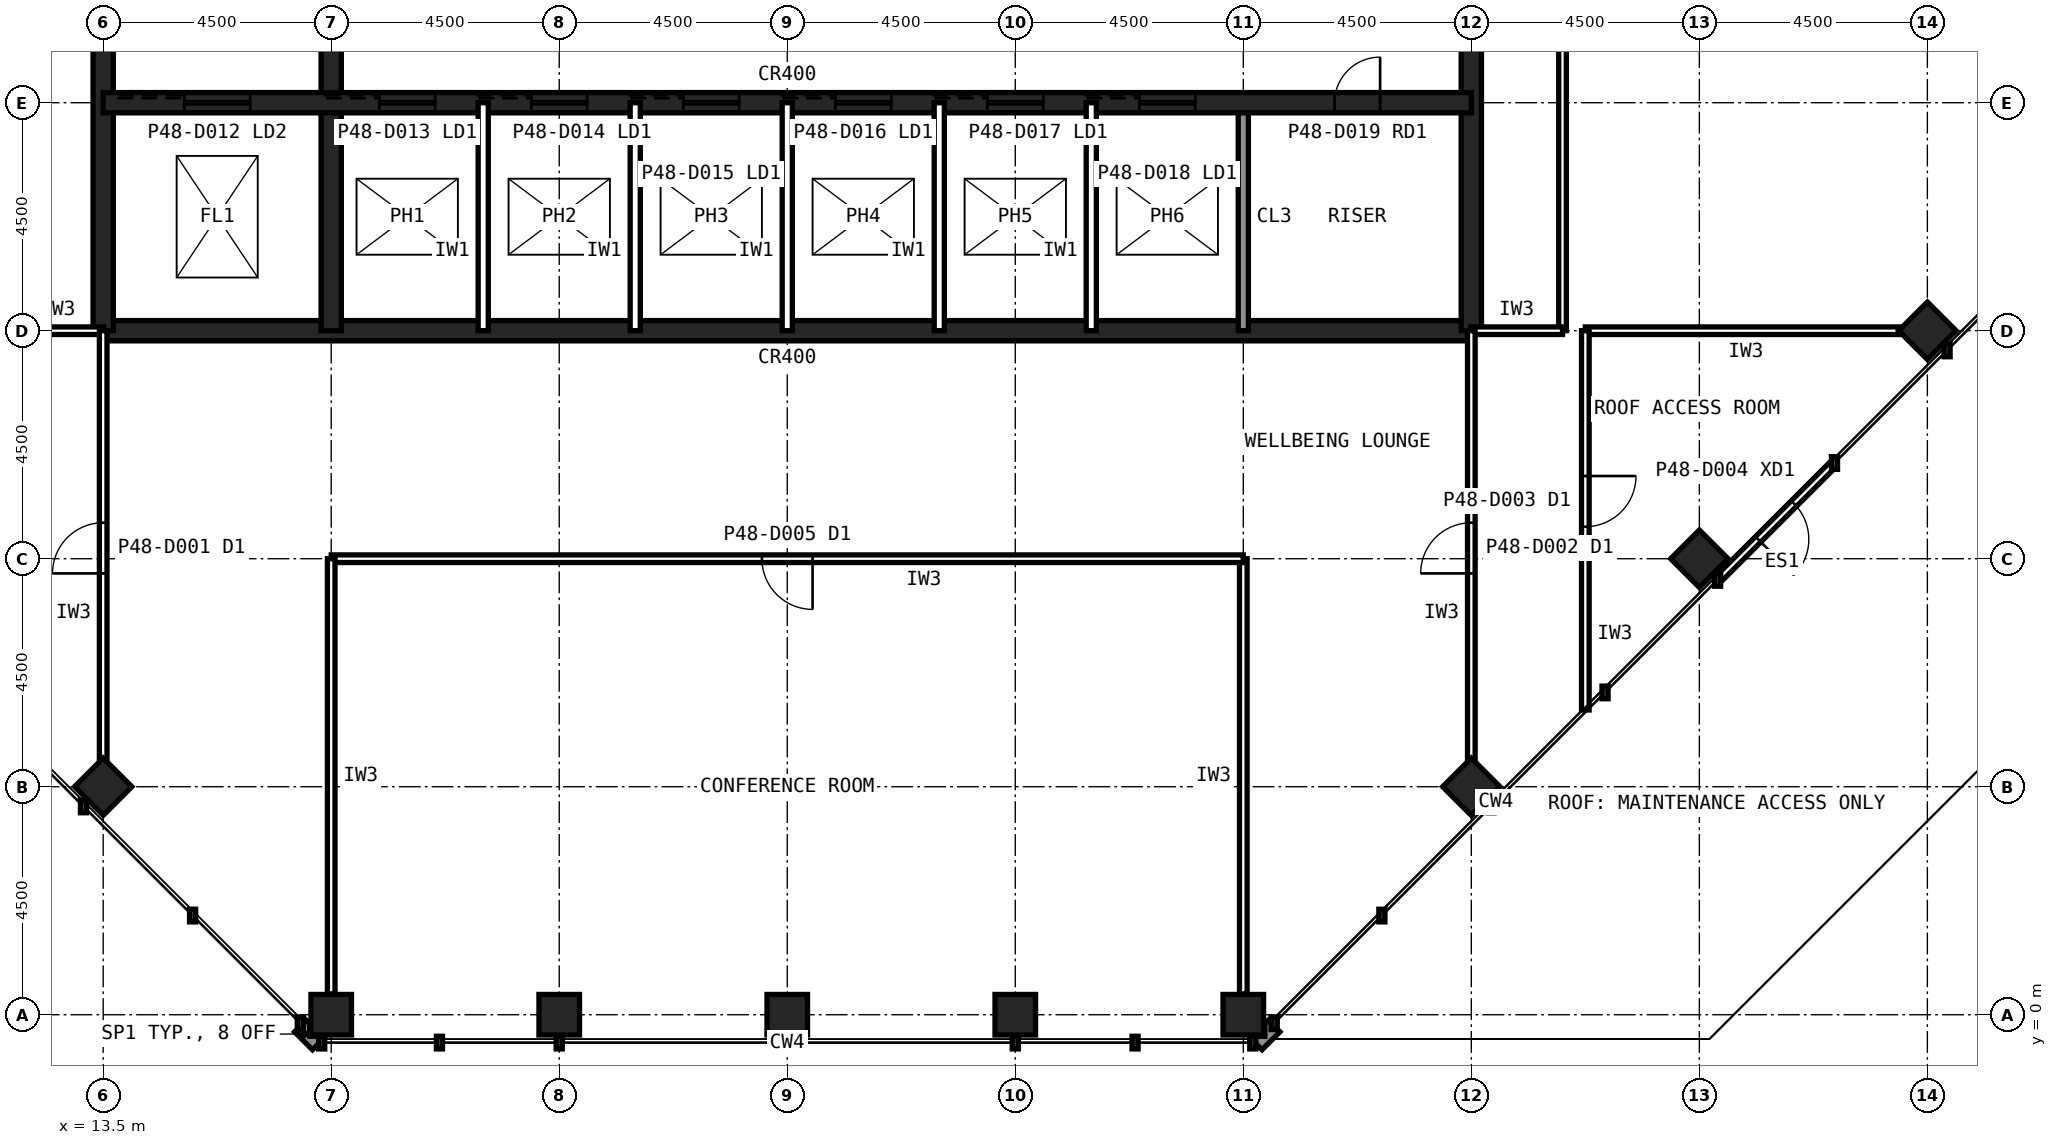
"""IFC4 building model, lengths in metres.
Left out: names, types, materials, properties, quantities, classifications, styles, units other than length and angle.
Written with IfcOpenShell. Run it as: python <this file> out.ifc"""

import sys

from ifc_helpers import new_model, si_unit, direction, frame, frame_2d, origin, origin_2d, place, context, subcontext, project, spatial, rectangle, hollow_rectangle, extrude, element, fill, save


model = new_model("IFC4")
c1 = context("Model", 3, precision=1e-05, world=origin(), true_north=direction((0.0, 1.0)))
c2 = subcontext(c1, "Body", "Model", "MODEL_VIEW")
j1 = project(units=[si_unit("LENGTHUNIT", "METRE"), si_unit("PLANEANGLEUNIT", "RADIAN")], contexts=[c1])
p1 = place(None, origin())
s1 = spatial("IfcSite", under=j1, at=p1, CompositionType="ELEMENT")
p2 = place(p1, origin())
s2 = spatial("IfcBuilding", under=s1, at=p2, CompositionType="ELEMENT")
p3 = place(p2, frame((0.0, 0.0, 205.6)))
s3 = spatial("IfcBuildingStorey", under=s2, at=p3, CompositionType="ELEMENT", Elevation=205.6)
for number, where, z_axis, x_axis in (
    (1, (18.0, 0.0, 0.0), (0.0, 0.0, 1.0), (1.0, 0.0, 0.0)),
    (2, (22.5, 0.0, 0.0), (0.0, 0.0, 1.0), (1.0, 0.0, 0.0)),
    (3, (27.0, 0.0, 0.0), (0.0, 0.0, 1.0), (1.0, 0.0, 0.0)),
    (4, (31.5, 0.0, 0.0), (0.0, 0.0, 1.0), (1.0, 0.0, 0.0)),
    (5, (36.0, 0.0, 0.0), (0.0, 0.0, 1.0), (1.0, 0.0, 0.0)),
    (6, (13.5, 4.5, 0.0), (0.0, 0.0, 1.0), (0.707, 0.707, 0.0)),
    (7, (40.5, 4.5, 0.0), (0.0, 0.0, 1.0), (0.707, 0.707, 0.0)),
    (8, (45.0, 9.0, 0.0), (0.0, 0.0, 1.0), (0.707, 0.707, 0.0)),
    (9, (49.5, 13.5, 0.0), (0.0, 0.0, 1.0), (0.707, 0.707, 0.0)),
):
    element("IfcColumn", number, at=place(p3, frame(where, z_axis=z_axis, x_axis=x_axis)), inside=s3, PredefinedType="COLUMN", context=c2, shape_type="SweptSolid", body=[
        extrude(hollow_rectangle(XDim=0.8, YDim=0.8, WallThickness=0.063, at=origin_2d()), origin(), (0.0, 0.0, 1.0), 5.0),
    ])
p4 = place(p3, frame((13.5, 13.5, 0.0), z_axis=(0.0, 0.0, 1.0), x_axis=(1.0, 0.0, 0.0)))
e10 = element("IfcWall", 10, at=p4, inside=s3, PredefinedType="SHEAR", context=c2, shape_type="SweptSolid", body=[
    extrude(rectangle(XDim=27.0, YDim=0.4, at=frame_2d((13.5, 0.0))), origin(), (0.0, 0.0, 1.0), 5.0),
])
p5 = place(p3, frame((40.5, 13.5, 0.0), z_axis=(0.0, 0.0, 1.0), x_axis=(0.0, 1.0, 0.0)))
e11 = element("IfcWall", 11, at=p5, inside=s3, PredefinedType="SHEAR", context=c2, shape_type="SweptSolid", body=[
    extrude(rectangle(XDim=27.0, YDim=0.4, at=frame_2d((13.5, 0.0))), origin(), (0.0, 0.0, 1.0), 5.0),
])
p6 = place(p5, frame((5.85, 0.0, 0.0)))
e12 = element("IfcOpeningElement", 12, at=p6, cuts=e11, PredefinedType="OPENING", context=c2, shape_type="SweptSolid", body=[
    extrude(rectangle(XDim=1.8, YDim=2.1, at=frame_2d((0.9, 1.05))), frame((0.0, 0.21, 0.0), z_axis=(0.0, -1.0, 0.0), x_axis=(1.0, 0.0, 0.0)), (0.0, 0.0, 1.0), 0.42),
])
p7 = place(p5, frame((19.65, 0.0, 0.0)))
e13 = element("IfcOpeningElement", 13, at=p7, cuts=e11, PredefinedType="OPENING", context=c2, shape_type="SweptSolid", body=[
    extrude(rectangle(XDim=1.2, YDim=2.1, at=frame_2d((0.6, 1.05))), frame((0.0, 0.21, 0.0), z_axis=(0.0, -1.0, 0.0), x_axis=(1.0, 0.0, 0.0)), (0.0, 0.0, 1.0), 0.42),
])
p8 = place(p3, frame((13.5, 40.5, 0.0), z_axis=(0.0, 0.0, 1.0), x_axis=(0.0, -1.0, 0.0)))
e14 = element("IfcWall", 14, at=p8, inside=s3, PredefinedType="SHEAR", context=c2, shape_type="SweptSolid", body=[
    extrude(rectangle(XDim=27.0, YDim=0.4, at=frame_2d((13.5, 0.0))), origin(), (0.0, 0.0, 1.0), 5.0),
])
p9 = place(p8, frame((19.65, 0.0, 0.0)))
e15 = element("IfcOpeningElement", 15, at=p9, cuts=e14, PredefinedType="OPENING", context=c2, shape_type="SweptSolid", body=[
    extrude(rectangle(XDim=1.2, YDim=2.1, at=frame_2d((0.6, 1.05))), frame((0.0, 0.21, 0.0), z_axis=(0.0, -1.0, 0.0), x_axis=(1.0, 0.0, 0.0)), (0.0, 0.0, 1.0), 0.42),
])
p10 = place(p8, frame((5.85, 0.0, 0.0)))
e16 = element("IfcOpeningElement", 16, at=p10, cuts=e14, PredefinedType="OPENING", context=c2, shape_type="SweptSolid", body=[
    extrude(rectangle(XDim=1.8, YDim=2.1, at=frame_2d((0.9, 1.05))), frame((0.0, 0.21, 0.0), z_axis=(0.0, -1.0, 0.0), x_axis=(1.0, 0.0, 0.0)), (0.0, 0.0, 1.0), 0.42),
])
p11 = place(p3, frame((18.0, 13.5, 0.0), z_axis=(0.0, 0.0, 1.0), x_axis=(0.0, 1.0, 0.0)))
e17 = element("IfcWall", 17, at=p11, inside=s3, PredefinedType="SHEAR", context=c2, shape_type="SweptSolid", body=[
    extrude(rectangle(XDim=18.0, YDim=0.4, at=frame_2d((9.0, 0.0))), origin(), (0.0, 0.0, 1.0), 5.0),
])
p12 = place(p3, frame((36.0, 13.5, 0.0), z_axis=(0.0, 0.0, 1.0), x_axis=(0.0, 1.0, 0.0)))
e18 = element("IfcWall", 18, at=p12, inside=s3, PredefinedType="SOLIDWALL", context=c2, shape_type="SweptSolid", body=[
    extrude(rectangle(XDim=4.5, YDim=0.2, at=frame_2d((2.25, 0.0))), origin(), (0.0, 0.0, 1.0), 4.84),
])
p13 = place(p3, frame((13.5, 18.0, 0.0), z_axis=(0.0, 0.0, 1.0), x_axis=(1.0, 0.0, 0.0)))
e19 = element("IfcWall", 19, at=p13, inside=s3, PredefinedType="SHEAR", context=c2, shape_type="SweptSolid", body=[
    extrude(rectangle(XDim=27.0, YDim=0.4, at=frame_2d((13.5, 0.0))), origin(), (0.0, 0.0, 1.0), 5.0),
])
p14 = place(p13, frame((24.3, 0.0, 0.0)))
e20 = element("IfcOpeningElement", 20, at=p14, cuts=e19, PredefinedType="OPENING", context=c2, shape_type="SweptSolid", body=[
    extrude(rectangle(XDim=0.9, YDim=2.1, at=frame_2d((0.45, 1.05))), frame((0.0, 0.21, 0.0), z_axis=(0.0, -1.0, 0.0), x_axis=(1.0, 0.0, 0.0)), (0.0, 0.0, 1.0), 0.42),
])
p15 = place(p13, frame((5.45, 0.0, 0.0)))
e21 = element("IfcOpeningElement", 21, at=p15, cuts=e19, PredefinedType="OPENING", context=c2, shape_type="SweptSolid", body=[
    extrude(rectangle(XDim=1.1, YDim=2.1, at=frame_2d((0.55, 1.05))), frame((0.0, 0.21, 0.0), z_axis=(0.0, -1.0, 0.0), x_axis=(1.0, 0.0, 0.0)), (0.0, 0.0, 1.0), 0.42),
])
p16 = place(p13, frame((8.45, 0.0, 0.0)))
e22 = element("IfcOpeningElement", 22, at=p16, cuts=e19, PredefinedType="OPENING", context=c2, shape_type="SweptSolid", body=[
    extrude(rectangle(XDim=1.1, YDim=2.1, at=frame_2d((0.55, 1.05))), frame((0.0, 0.21, 0.0), z_axis=(0.0, -1.0, 0.0), x_axis=(1.0, 0.0, 0.0)), (0.0, 0.0, 1.0), 0.42),
])
p17 = place(p13, frame((11.45, 0.0, 0.0)))
e23 = element("IfcOpeningElement", 23, at=p17, cuts=e19, PredefinedType="OPENING", context=c2, shape_type="SweptSolid", body=[
    extrude(rectangle(XDim=1.1, YDim=2.1, at=frame_2d((0.55, 1.05))), frame((0.0, 0.21, 0.0), z_axis=(0.0, -1.0, 0.0), x_axis=(1.0, 0.0, 0.0)), (0.0, 0.0, 1.0), 0.42),
])
p18 = place(p13, frame((14.45, 0.0, 0.0)))
e24 = element("IfcOpeningElement", 24, at=p18, cuts=e19, PredefinedType="OPENING", context=c2, shape_type="SweptSolid", body=[
    extrude(rectangle(XDim=1.1, YDim=2.1, at=frame_2d((0.55, 1.05))), frame((0.0, 0.21, 0.0), z_axis=(0.0, -1.0, 0.0), x_axis=(1.0, 0.0, 0.0)), (0.0, 0.0, 1.0), 0.42),
])
p19 = place(p13, frame((17.45, 0.0, 0.0)))
e25 = element("IfcOpeningElement", 25, at=p19, cuts=e19, PredefinedType="OPENING", context=c2, shape_type="SweptSolid", body=[
    extrude(rectangle(XDim=1.1, YDim=2.1, at=frame_2d((0.55, 1.05))), frame((0.0, 0.21, 0.0), z_axis=(0.0, -1.0, 0.0), x_axis=(1.0, 0.0, 0.0)), (0.0, 0.0, 1.0), 0.42),
])
p20 = place(p13, frame((20.45, 0.0, 0.0)))
e26 = element("IfcOpeningElement", 26, at=p20, cuts=e19, PredefinedType="OPENING", context=c2, shape_type="SweptSolid", body=[
    extrude(rectangle(XDim=1.1, YDim=2.1, at=frame_2d((0.55, 1.05))), frame((0.0, 0.21, 0.0), z_axis=(0.0, -1.0, 0.0), x_axis=(1.0, 0.0, 0.0)), (0.0, 0.0, 1.0), 0.42),
])
p21 = place(p13, frame((1.6, 0.0, 0.0)))
e27 = element("IfcOpeningElement", 27, at=p21, cuts=e19, PredefinedType="OPENING", context=c2, shape_type="SweptSolid", body=[
    extrude(rectangle(XDim=1.3, YDim=2.2, at=frame_2d((0.65, 1.1))), frame((0.0, 0.21, 0.0), z_axis=(0.0, -1.0, 0.0), x_axis=(1.0, 0.0, 0.0)), (0.0, 0.0, 1.0), 0.42),
])
p22 = place(p3, frame((47.639, 10.861, 0.0), z_axis=(0.0, 0.0, 1.0), x_axis=(-0.707106781187, -0.707106781187, 0.0)))
e28 = element("IfcWall", 28, at=p22, inside=s3, PredefinedType="USERDEFINED", context=c2, shape_type="SweptSolid", body=[
    extrude(rectangle(XDim=3.182, YDim=0.15, at=frame_2d((1.591, 0.0))), origin(), (0.0, 0.0, 1.0), 5.0),
])
p23 = place(p22, frame((1.091, 0.0, 0.0)))
e29 = element("IfcOpeningElement", 29, at=p23, cuts=e28, PredefinedType="OPENING", context=c2, shape_type="SweptSolid", body=[
    extrude(rectangle(XDim=1.0, YDim=2.1, at=frame_2d((0.5, 1.05))), frame((0.0, 0.085, 0.0), z_axis=(0.0, -1.0, 0.0), x_axis=(1.0, 0.0, 0.0)), (0.0, 0.0, 1.0), 0.17),
])
for number, where, z_axis, x_axis in (
    (30, (21.0, 13.5, 0.0), (0.0, 0.0, 1.0), (0.0, 1.0, 0.0)),
    (31, (24.0, 13.5, 0.0), (0.0, 0.0, 1.0), (0.0, 1.0, 0.0)),
    (32, (27.0, 13.5, 0.0), (0.0, 0.0, 1.0), (0.0, 1.0, 0.0)),
    (33, (30.0, 13.5, 0.0), (0.0, 0.0, 1.0), (0.0, 1.0, 0.0)),
    (34, (33.0, 13.5, 0.0), (0.0, 0.0, 1.0), (0.0, 1.0, 0.0)),
):
    element("IfcWall", number, at=place(p3, frame(where, z_axis=z_axis, x_axis=x_axis)), inside=s3, PredefinedType="PARTITIONING", context=c2, shape_type="SweptSolid", body=[
        extrude(rectangle(XDim=4.5, YDim=0.2, at=frame_2d((2.25, 0.0))), origin(), (0.0, 0.0, 1.0), 4.84),
    ])
p24 = place(p3, frame((42.3, 13.5, 0.0), z_axis=(0.0, 0.0, 1.0), x_axis=(0.0, 1.0, 0.0)))
e35 = element("IfcWall", 35, at=p24, inside=s3, PredefinedType="PARTITIONING", context=c2, shape_type="SweptSolid", body=[
    extrude(rectangle(XDim=27.0, YDim=0.15, at=frame_2d((13.5, 0.0))), origin(), (0.0, 0.0, 1.0), 4.84),
])
p25 = place(p24, frame((13.0, 0.0, 0.0)))
e36 = element("IfcOpeningElement", 36, at=p25, cuts=e35, PredefinedType="OPENING", context=c2, shape_type="SweptSolid", body=[
    extrude(rectangle(XDim=1.0, YDim=2.1, at=frame_2d((0.5, 1.05))), frame((0.0, 0.085, 0.0), z_axis=(0.0, -1.0, 0.0), x_axis=(1.0, 0.0, 0.0)), (0.0, 0.0, 1.0), 0.17),
])
for number, where, z_axis, x_axis in (
    (37, (11.7, 13.5, 0.0), (0.0, 0.0, 1.0), (1.0, 0.0, 0.0)),
    (38, (40.49, 13.5, 0.0), (0.0, 0.0, 1.0), (1.0, 0.0, 0.0)),
):
    element("IfcWall", number, at=place(p3, frame(where, z_axis=z_axis, x_axis=x_axis)), inside=s3, PredefinedType="PARTITIONING", context=c2, shape_type="SweptSolid", body=[
        extrude(rectangle(XDim=1.81, YDim=0.15, at=frame_2d((0.905, 0.0))), origin(), (0.0, 0.0, 1.0), 3.989),
    ])
p26 = place(p3, frame((36.0, 0.41, 0.0), z_axis=(0.0, 0.0, 1.0), x_axis=(0.0, 1.0, 0.0)))
e39 = element("IfcWall", 39, at=p26, inside=s3, PredefinedType="PARTITIONING", context=c2, shape_type="SweptSolid", body=[
    extrude(rectangle(XDim=8.59, YDim=0.15, at=frame_2d((4.295, 0.0))), origin(), (0.0, 0.0, 1.0), 3.989),
])
p27 = place(p3, frame((36.0, 9.0, 0.0), z_axis=(0.0, 0.0, 1.0), x_axis=(-1.0, 0.0, 0.0)))
e40 = element("IfcWall", 40, at=p27, inside=s3, PredefinedType="PARTITIONING", context=c2, shape_type="SweptSolid", body=[
    extrude(rectangle(XDim=18.0, YDim=0.15, at=frame_2d((9.0, 0.0))), origin(), (0.0, 0.0, 1.0), 4.84),
])
p28 = place(p27, frame((8.5, 0.0, 0.0)))
e41 = element("IfcOpeningElement", 41, at=p28, cuts=e40, PredefinedType="OPENING", context=c2, shape_type="SweptSolid", body=[
    extrude(rectangle(XDim=1.0, YDim=2.1, at=frame_2d((0.5, 1.05))), frame((0.0, 0.085, 0.0), z_axis=(0.0, -1.0, 0.0), x_axis=(1.0, 0.0, 0.0)), (0.0, 0.0, 1.0), 0.17),
])
p29 = place(p3, frame((18.0, 9.0, 0.0), z_axis=(0.0, 0.0, 1.0), x_axis=(0.0, -1.0, 0.0)))
e42 = element("IfcWall", 42, at=p29, inside=s3, PredefinedType="PARTITIONING", context=c2, shape_type="SweptSolid", body=[
    extrude(rectangle(XDim=8.59, YDim=0.15, at=frame_2d((4.295, 0.0))), origin(), (0.0, 0.0, 1.0), 3.989),
])
p30 = place(p3, frame((49.09, 13.5, 0.0), z_axis=(0.0, 0.0, 1.0), x_axis=(-1.0, 0.0, 0.0)))
e43 = element("IfcWall", 43, at=p30, inside=s3, PredefinedType="PARTITIONING", context=c2, shape_type="SweptSolid", body=[
    extrude(rectangle(XDim=6.34, YDim=0.15, at=frame_2d((3.17, 0.0))), origin(), (0.0, 0.0, 1.0), 3.989),
])
p31 = place(p3, frame((42.75, 13.5, 0.0), z_axis=(0.0, 0.0, 1.0), x_axis=(0.0, -1.0, 0.0)))
e44 = element("IfcWall", 44, at=p31, inside=s3, PredefinedType="PARTITIONING", context=c2, shape_type="SweptSolid", body=[
    extrude(rectangle(XDim=7.485, YDim=0.15, at=frame_2d((3.743, 0.0))), origin(), (0.0, 0.0, 1.0), 4.84),
])
p32 = place(p31, frame((2.868, 0.0, 0.0)))
e45 = element("IfcOpeningElement", 45, at=p32, cuts=e44, PredefinedType="OPENING", context=c2, shape_type="SweptSolid", body=[
    extrude(rectangle(XDim=1.0, YDim=2.1, at=frame_2d((0.5, 1.05))), frame((0.0, 0.085, 0.0), z_axis=(0.0, -1.0, 0.0), x_axis=(1.0, 0.0, 0.0)), (0.0, 0.0, 1.0), 0.17),
])
p33 = place(p3, frame((40.5, 4.92, 0.0), z_axis=(0.0, 0.0, 1.0), x_axis=(0.0, 1.0, 0.0)))
e46 = element("IfcWall", 46, at=p33, inside=s3, PredefinedType="PARTITIONING", context=c2, shape_type="SweptSolid", body=[
    extrude(rectangle(XDim=8.58, YDim=0.15, at=frame_2d((4.29, 0.0))), origin(), (0.0, 0.0, 1.0), 3.989),
])
p34 = place(p33, frame((3.79, 0.0, 0.0)))
e47 = element("IfcOpeningElement", 47, at=p34, cuts=e46, PredefinedType="OPENING", context=c2, shape_type="SweptSolid", body=[
    extrude(rectangle(XDim=1.0, YDim=2.1, at=frame_2d((0.5, 1.05))), frame((0.0, 0.085, 0.0), z_axis=(0.0, -1.0, 0.0), x_axis=(1.0, 0.0, 0.0)), (0.0, 0.0, 1.0), 0.17),
])
p35 = place(p3, frame((13.5, 4.92, 0.0), z_axis=(0.0, 0.0, 1.0), x_axis=(0.0, 1.0, 0.0)))
e48 = element("IfcWall", 48, at=p35, inside=s3, PredefinedType="PARTITIONING", context=c2, shape_type="SweptSolid", body=[
    extrude(rectangle(XDim=8.58, YDim=0.15, at=frame_2d((4.29, 0.0))), origin(), (0.0, 0.0, 1.0), 3.989),
])
p36 = place(p35, frame((3.79, 0.0, 0.0)))
e49 = element("IfcOpeningElement", 49, at=p36, cuts=e48, PredefinedType="OPENING", context=c2, shape_type="SweptSolid", body=[
    extrude(rectangle(XDim=1.0, YDim=2.1, at=frame_2d((0.5, 1.05))), frame((0.0, 0.085, 0.0), z_axis=(0.0, -1.0, 0.0), x_axis=(1.0, 0.0, 0.0)), (0.0, 0.0, 1.0), 0.17),
])
p37 = place(p23, origin())
e50 = element("IfcDoor", 50, at=p37, inside=s3, OperationType="SINGLE_SWING_RIGHT", PredefinedType="DOOR", context=c2, shape_type="SweptSolid", body=[
    extrude(rectangle(XDim=1.0, YDim=2.1, at=frame_2d((0.5, 1.05))), frame((0.0, 0.025, 0.0), z_axis=(0.0, -1.0, 0.0), x_axis=(1.0, 0.0, 0.0)), (0.0, 0.0, 1.0), 0.05),
])
fill(e29, e50)
p38 = place(p14, origin())
e51 = element("IfcDoor", 51, at=p38, inside=s3, OperationType="SINGLE_SWING_RIGHT", PredefinedType="DOOR", context=c2, shape_type="SweptSolid", body=[
    extrude(rectangle(XDim=0.9, YDim=2.1, at=frame_2d((0.45, 1.05))), frame((0.0, 0.025, 0.0), z_axis=(0.0, -1.0, 0.0), x_axis=(1.0, 0.0, 0.0)), (0.0, 0.0, 1.0), 0.05),
])
fill(e20, e51)
p39 = place(p15, origin())
e52 = element("IfcDoor", 52, at=p39, inside=s3, OperationType="SLIDING_TO_LEFT", PredefinedType="DOOR", context=c2, shape_type="SweptSolid", body=[
    extrude(rectangle(XDim=1.1, YDim=2.1, at=frame_2d((0.55, 1.05))), frame((0.0, 0.025, 0.0), z_axis=(0.0, -1.0, 0.0), x_axis=(1.0, 0.0, 0.0)), (0.0, 0.0, 1.0), 0.05),
])
fill(e21, e52)
p40 = place(p16, origin())
e53 = element("IfcDoor", 53, at=p40, inside=s3, OperationType="SLIDING_TO_LEFT", PredefinedType="DOOR", context=c2, shape_type="SweptSolid", body=[
    extrude(rectangle(XDim=1.1, YDim=2.1, at=frame_2d((0.55, 1.05))), frame((0.0, 0.025, 0.0), z_axis=(0.0, -1.0, 0.0), x_axis=(1.0, 0.0, 0.0)), (0.0, 0.0, 1.0), 0.05),
])
fill(e22, e53)
p41 = place(p17, origin())
e54 = element("IfcDoor", 54, at=p41, inside=s3, OperationType="SLIDING_TO_LEFT", PredefinedType="DOOR", context=c2, shape_type="SweptSolid", body=[
    extrude(rectangle(XDim=1.1, YDim=2.1, at=frame_2d((0.55, 1.05))), frame((0.0, 0.025, 0.0), z_axis=(0.0, -1.0, 0.0), x_axis=(1.0, 0.0, 0.0)), (0.0, 0.0, 1.0), 0.05),
])
fill(e23, e54)
p42 = place(p18, origin())
e55 = element("IfcDoor", 55, at=p42, inside=s3, OperationType="SLIDING_TO_LEFT", PredefinedType="DOOR", context=c2, shape_type="SweptSolid", body=[
    extrude(rectangle(XDim=1.1, YDim=2.1, at=frame_2d((0.55, 1.05))), frame((0.0, 0.025, 0.0), z_axis=(0.0, -1.0, 0.0), x_axis=(1.0, 0.0, 0.0)), (0.0, 0.0, 1.0), 0.05),
])
fill(e24, e55)
p43 = place(p19, origin())
e56 = element("IfcDoor", 56, at=p43, inside=s3, OperationType="SLIDING_TO_LEFT", PredefinedType="DOOR", context=c2, shape_type="SweptSolid", body=[
    extrude(rectangle(XDim=1.1, YDim=2.1, at=frame_2d((0.55, 1.05))), frame((0.0, 0.025, 0.0), z_axis=(0.0, -1.0, 0.0), x_axis=(1.0, 0.0, 0.0)), (0.0, 0.0, 1.0), 0.05),
])
fill(e25, e56)
p44 = place(p20, origin())
e57 = element("IfcDoor", 57, at=p44, inside=s3, OperationType="SLIDING_TO_LEFT", PredefinedType="DOOR", context=c2, shape_type="SweptSolid", body=[
    extrude(rectangle(XDim=1.1, YDim=2.1, at=frame_2d((0.55, 1.05))), frame((0.0, 0.025, 0.0), z_axis=(0.0, -1.0, 0.0), x_axis=(1.0, 0.0, 0.0)), (0.0, 0.0, 1.0), 0.05),
])
fill(e26, e57)
p45 = place(p21, origin())
e58 = element("IfcDoor", 58, at=p45, inside=s3, OperationType="SLIDING_TO_LEFT", PredefinedType="DOOR", context=c2, shape_type="SweptSolid", body=[
    extrude(rectangle(XDim=1.3, YDim=2.2, at=frame_2d((0.65, 1.1))), frame((0.0, 0.025, 0.0), z_axis=(0.0, -1.0, 0.0), x_axis=(1.0, 0.0, 0.0)), (0.0, 0.0, 1.0), 0.05),
])
fill(e27, e58)
p46 = place(p28, origin())
e59 = element("IfcDoor", 59, at=p46, inside=s3, OperationType="SINGLE_SWING_LEFT", PredefinedType="DOOR", context=c2, shape_type="SweptSolid", body=[
    extrude(rectangle(XDim=1.0, YDim=2.1, at=frame_2d((0.5, 1.05))), frame((0.0, 0.025, 0.0), z_axis=(0.0, -1.0, 0.0), x_axis=(1.0, 0.0, 0.0)), (0.0, 0.0, 1.0), 0.05),
])
fill(e41, e59)
p47 = place(p32, origin())
e60 = element("IfcDoor", 60, at=p47, inside=s3, OperationType="SINGLE_SWING_LEFT", PredefinedType="DOOR", context=c2, shape_type="SweptSolid", body=[
    extrude(rectangle(XDim=1.0, YDim=2.1, at=frame_2d((0.5, 1.05))), frame((0.0, 0.025, 0.0), z_axis=(0.0, -1.0, 0.0), x_axis=(1.0, 0.0, 0.0)), (0.0, 0.0, 1.0), 0.05),
])
fill(e45, e60)
p48 = place(p34, origin())
e61 = element("IfcDoor", 61, at=p48, inside=s3, OperationType="SINGLE_SWING_LEFT", PredefinedType="DOOR", context=c2, shape_type="SweptSolid", body=[
    extrude(rectangle(XDim=1.0, YDim=2.1, at=frame_2d((0.5, 1.05))), frame((0.0, 0.025, 0.0), z_axis=(0.0, -1.0, 0.0), x_axis=(1.0, 0.0, 0.0)), (0.0, 0.0, 1.0), 0.05),
])
fill(e47, e61)
p49 = place(p36, origin())
e62 = element("IfcDoor", 62, at=p49, inside=s3, OperationType="SINGLE_SWING_LEFT", PredefinedType="DOOR", context=c2, shape_type="SweptSolid", body=[
    extrude(rectangle(XDim=1.0, YDim=2.1, at=frame_2d((0.5, 1.05))), frame((0.0, 0.025, 0.0), z_axis=(0.0, -1.0, 0.0), x_axis=(1.0, 0.0, 0.0)), (0.0, 0.0, 1.0), 0.05),
])
fill(e49, e62)
save(model, sys.argv[1])
